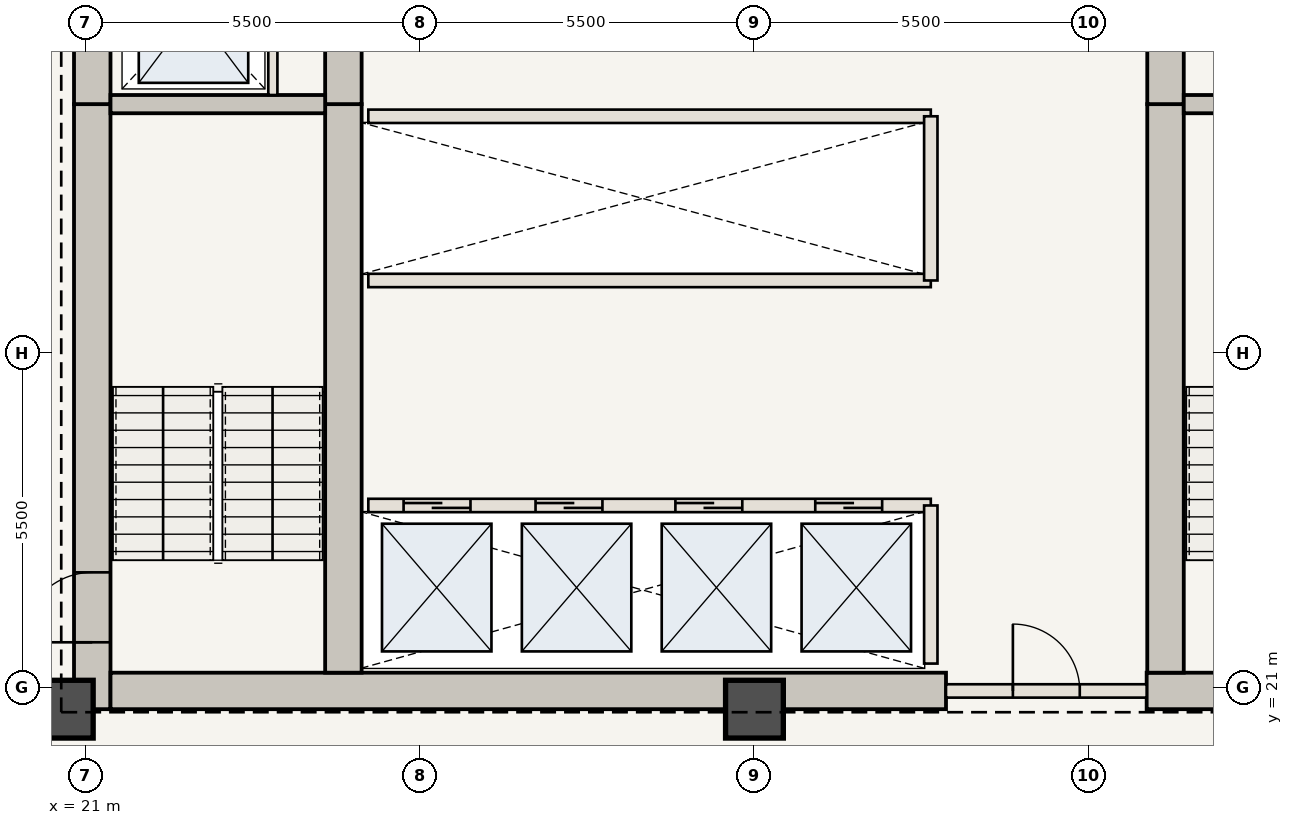
"""IFC4 building model, lengths in metres.
Left out: names, types, materials, properties, quantities, classifications, styles, units other than length and angle.
Written with IfcOpenShell. Run it as: python <this file> out.ifc"""

import sys

from ifc_helpers import new_model, si_unit, direction, frame, frame_2d, origin, origin_2d, place, context, subcontext, project, spatial, rectangle, extrude, element, fill, save


model = new_model("IFC4")
c1 = context("Model", 3, precision=1e-05, world=origin(), true_north=direction((0.0, 1.0)))
c2 = subcontext(c1, "Body", "Model", "MODEL_VIEW")
j1 = project(units=[si_unit("LENGTHUNIT", "METRE"), si_unit("PLANEANGLEUNIT", "RADIAN")], contexts=[c1])
p1 = place(None, origin())
s1 = spatial("IfcSite", under=j1, at=p1, CompositionType="ELEMENT")
p2 = place(p1, origin())
s2 = spatial("IfcBuilding", under=s1, at=p2, CompositionType="ELEMENT")
p3 = place(p2, frame((0.0, 0.0, 114.45)))
s3 = spatial("IfcBuildingStorey", under=s2, at=p3, CompositionType="ELEMENT", Elevation=114.45)
p4 = place(p3, frame((21.11, 20.65, 0.0), z_axis=(0.0, 0.0, 1.0), x_axis=(0.0, 1.0, 0.0)))
e1 = element("IfcWall", 1, at=p4, inside=s3, PredefinedType="SHEAR", context=c2, shape_type="SweptSolid", body=[
    extrude(rectangle(XDim=9.95, YDim=0.6, at=frame_2d((4.975, 0.0))), origin(), (0.0, 0.0, 1.0), 3.85),
])
p5 = place(p4, frame((1.1, 0.0, 0.0)))
e2 = element("IfcOpeningElement", 2, at=p5, cuts=e1, PredefinedType="OPENING", context=c2, shape_type="SweptSolid", body=[
    extrude(rectangle(XDim=1.15, YDim=2.15, at=frame_2d((0.575, 1.075))), frame((0.0, 0.31, 0.0), z_axis=(0.0, -1.0, 0.0), x_axis=(1.0, 0.0, 0.0)), (0.0, 0.0, 1.0), 0.62),
])
p6 = place(p3, frame((21.11, 30.6, 0.0), z_axis=(0.0, 0.0, 1.0), x_axis=(0.0, 1.0, 0.0)))
e3 = element("IfcWall", 3, at=p6, inside=s3, PredefinedType="SHEAR", context=c2, shape_type="SweptSolid", body=[
    extrude(rectangle(XDim=12.7, YDim=0.6, at=frame_2d((6.35, 0.0))), origin(), (0.0, 0.0, 1.0), 3.85),
])
p7 = place(p6, frame((4.2, 0.0, 0.0)))
e4 = element("IfcOpeningElement", 4, at=p7, cuts=e3, PredefinedType="OPENING", context=c2, shape_type="SweptSolid", body=[
    extrude(rectangle(XDim=1.1, YDim=2.15, at=frame_2d((0.55, 1.075))), frame((0.0, 0.31, 0.0), z_axis=(0.0, -1.0, 0.0), x_axis=(1.0, 0.0, 0.0)), (0.0, 0.0, 1.0), 0.62),
])
p8 = place(p6, frame((9.2, 0.0, 0.0)))
e5 = element("IfcOpeningElement", 5, at=p8, cuts=e3, PredefinedType="OPENING", context=c2, shape_type="SweptSolid", body=[
    extrude(rectangle(XDim=0.92, YDim=2.1, at=frame_2d((0.46, 1.05))), frame((0.0, 0.31, 0.0), z_axis=(0.0, -1.0, 0.0), x_axis=(1.0, 0.0, 0.0)), (0.0, 0.0, 1.0), 0.62),
])
p9 = place(p3, frame((21.41, 20.95, 0.0), z_axis=(0.0, 0.0, 1.0), x_axis=(1.0, 0.0, 0.0)))
e6 = element("IfcWall", 6, at=p9, inside=s3, PredefinedType="SHEAR", context=c2, shape_type="SweptSolid", body=[
    extrude(rectangle(XDim=13.74, YDim=0.6, at=frame_2d((6.87, 0.0))), origin(), (0.0, 0.0, 1.0), 3.85),
])
p10 = place(p3, frame((38.45, 20.95, 0.0), z_axis=(0.0, 0.0, 1.0), x_axis=(1.0, 0.0, 0.0)))
e7 = element("IfcWall", 7, at=p10, inside=s3, PredefinedType="SHEAR", context=c2, shape_type="SweptSolid", body=[
    extrude(rectangle(XDim=4.14, YDim=0.6, at=frame_2d((2.07, 0.0))), origin(), (0.0, 0.0, 1.0), 3.85),
])
p11 = place(p3, frame((25.24, 21.25, 0.0), z_axis=(0.0, 0.0, 1.0), x_axis=(0.0, 1.0, 0.0)))
e8 = element("IfcWall", 8, at=p11, inside=s3, PredefinedType="SHEAR", context=c2, shape_type="SweptSolid", body=[
    extrude(rectangle(XDim=9.35, YDim=0.6, at=frame_2d((4.675, 0.0))), origin(), (0.0, 0.0, 1.0), 3.85),
])
p12 = place(p3, frame((25.24, 30.6, 0.0), z_axis=(0.0, 0.0, 1.0), x_axis=(0.0, 1.0, 0.0)))
e9 = element("IfcWall", 9, at=p12, inside=s3, PredefinedType="SHEAR", context=c2, shape_type="SweptSolid", body=[
    extrude(rectangle(XDim=12.1, YDim=0.6, at=frame_2d((6.05, 0.0))), origin(), (0.0, 0.0, 1.0), 3.85),
])
p13 = place(p12, frame((6.25, 0.0, 0.0)))
e10 = element("IfcOpeningElement", 10, at=p13, cuts=e9, PredefinedType="OPENING", context=c2, shape_type="SweptSolid", body=[
    extrude(rectangle(XDim=1.1, YDim=2.15, at=frame_2d((0.55, 1.075))), frame((0.0, 0.31, 0.0), z_axis=(0.0, -1.0, 0.0), x_axis=(1.0, 0.0, 0.0)), (0.0, 0.0, 1.0), 0.62),
])
p14 = place(p3, frame((38.76, 21.25, 0.0), z_axis=(0.0, 0.0, 1.0), x_axis=(0.0, 1.0, 0.0)))
e11 = element("IfcWall", 11, at=p14, inside=s3, PredefinedType="SHEAR", context=c2, shape_type="SweptSolid", body=[
    extrude(rectangle(XDim=9.35, YDim=0.6, at=frame_2d((4.675, 0.0))), origin(), (0.0, 0.0, 1.0), 3.85),
])
p15 = place(p3, frame((38.76, 30.6, 0.0), z_axis=(0.0, 0.0, 1.0), x_axis=(0.0, 1.0, 0.0)))
e12 = element("IfcWall", 12, at=p15, inside=s3, PredefinedType="SHEAR", context=c2, shape_type="SweptSolid", body=[
    extrude(rectangle(XDim=12.1, YDim=0.6, at=frame_2d((6.05, 0.0))), origin(), (0.0, 0.0, 1.0), 3.85),
])
for number, where, z_axis, x_axis in (
    (13, (20.65, 20.65, 0.0), (0.0, 0.0, 1.0), (1.0, 0.0, 0.0)),
    (14, (32.0, 20.65, 0.0), (0.0, 0.0, 1.0), (1.0, 0.0, 0.0)),
):
    element("IfcColumn", number, at=place(p3, frame(where, z_axis=z_axis, x_axis=x_axis)), inside=s3, PredefinedType="COLUMN", context=c2, shape_type="SweptSolid", body=[
        extrude(rectangle(XDim=0.95, YDim=0.95, at=origin_2d()), origin(), (0.0, 0.0, 1.0), 3.85),
    ])
for number, where, z_axis, x_axis in (
    (15, (21.41, 30.6, 0.0), (0.0, 0.0, 1.0), (1.0, 0.0, 0.0)),
    (16, (39.06, 30.6, 0.0), (0.0, 0.0, 1.0), (1.0, 0.0, 0.0)),
):
    element("IfcWall", number, at=place(p3, frame(where, z_axis=z_axis, x_axis=x_axis)), inside=s3, PredefinedType="SHEAR", context=c2, shape_type="SweptSolid", body=[
        extrude(rectangle(XDim=3.53, YDim=0.3, at=frame_2d((1.765, 0.0))), origin(), (0.0, 0.0, 1.0), 3.685),
    ])
p16 = place(p3, frame((24.08, 30.75, 0.0), z_axis=(0.0, 0.0, 1.0), x_axis=(0.0, 1.0, 0.0)))
e17 = element("IfcWall", 17, at=p16, inside=s3, PredefinedType="STANDARD", context=c2, shape_type="SweptSolid", body=[
    extrude(rectangle(XDim=2.65, YDim=0.15, at=frame_2d((1.325, 0.0))), origin(), (0.0, 0.0, 1.0), 3.685),
])
p17 = place(p3, frame((35.15, 20.95, 0.0), z_axis=(0.0, 0.0, 1.0), x_axis=(1.0, 0.0, 0.0)))
e18 = element("IfcWall", 18, at=p17, inside=s3, PredefinedType="STANDARD", context=c2, shape_type="SweptSolid", body=[
    extrude(rectangle(XDim=3.3, YDim=0.22, at=frame_2d((1.65, 0.0))), origin(), (0.0, 0.0, 1.0), 3.685),
])
p18 = place(p17, frame((1.1, 0.0, 0.0)))
e19 = element("IfcOpeningElement", 19, at=p18, cuts=e18, PredefinedType="OPENING", context=c2, shape_type="SweptSolid", body=[
    extrude(rectangle(XDim=1.1, YDim=2.15, at=frame_2d((0.55, 1.075))), frame((0.0, 0.12, 0.0), z_axis=(0.0, -1.0, 0.0), x_axis=(1.0, 0.0, 0.0)), (0.0, 0.0, 1.0), 0.24),
])
p19 = place(p3, frame((25.65, 24.0, 0.0), z_axis=(0.0, 0.0, 1.0), x_axis=(1.0, 0.0, 0.0)))
e20 = element("IfcWall", 20, at=p19, inside=s3, PredefinedType="STANDARD", context=c2, shape_type="SweptSolid", body=[
    extrude(rectangle(XDim=9.25, YDim=0.22, at=frame_2d((4.625, 0.0))), origin(), (0.0, 0.0, 1.0), 3.685),
])
p20 = place(p19, frame((0.58, 0.0, 0.0)))
e21 = element("IfcOpeningElement", 21, at=p20, cuts=e20, PredefinedType="OPENING", context=c2, shape_type="SweptSolid", body=[
    extrude(rectangle(XDim=1.1, YDim=2.15, at=frame_2d((0.55, 1.075))), frame((0.0, 0.12, 0.0), z_axis=(0.0, -1.0, 0.0), x_axis=(1.0, 0.0, 0.0)), (0.0, 0.0, 1.0), 0.24),
])
p21 = place(p19, frame((2.75, 0.0, 0.0)))
e22 = element("IfcOpeningElement", 22, at=p21, cuts=e20, PredefinedType="OPENING", context=c2, shape_type="SweptSolid", body=[
    extrude(rectangle(XDim=1.1, YDim=2.15, at=frame_2d((0.55, 1.075))), frame((0.0, 0.12, 0.0), z_axis=(0.0, -1.0, 0.0), x_axis=(1.0, 0.0, 0.0)), (0.0, 0.0, 1.0), 0.24),
])
p22 = place(p19, frame((5.05, 0.0, 0.0)))
e23 = element("IfcOpeningElement", 23, at=p22, cuts=e20, PredefinedType="OPENING", context=c2, shape_type="SweptSolid", body=[
    extrude(rectangle(XDim=1.1, YDim=2.15, at=frame_2d((0.55, 1.075))), frame((0.0, 0.12, 0.0), z_axis=(0.0, -1.0, 0.0), x_axis=(1.0, 0.0, 0.0)), (0.0, 0.0, 1.0), 0.24),
])
p23 = place(p19, frame((7.35, 0.0, 0.0)))
e24 = element("IfcOpeningElement", 24, at=p23, cuts=e20, PredefinedType="OPENING", context=c2, shape_type="SweptSolid", body=[
    extrude(rectangle(XDim=1.1, YDim=2.15, at=frame_2d((0.55, 1.075))), frame((0.0, 0.12, 0.0), z_axis=(0.0, -1.0, 0.0), x_axis=(1.0, 0.0, 0.0)), (0.0, 0.0, 1.0), 0.24),
])
p24 = place(p3, frame((34.9, 21.4, 0.0), z_axis=(0.0, 0.0, 1.0), x_axis=(0.0, 1.0, 0.0)))
e25 = element("IfcWall", 25, at=p24, inside=s3, PredefinedType="STANDARD", context=c2, shape_type="SweptSolid", body=[
    extrude(rectangle(XDim=2.6, YDim=0.22, at=frame_2d((1.3, 0.0))), origin(), (0.0, 0.0, 1.0), 3.685),
])
for number, where, z_axis, x_axis in (
    (26, (25.65, 27.7, 0.0), (0.0, 0.0, 1.0), (1.0, 0.0, 0.0)),
    (27, (25.65, 30.4, 0.0), (0.0, 0.0, 1.0), (1.0, 0.0, 0.0)),
):
    element("IfcWall", number, at=place(p3, frame(where, z_axis=z_axis, x_axis=x_axis)), inside=s3, PredefinedType="STANDARD", context=c2, shape_type="SweptSolid", body=[
        extrude(rectangle(XDim=9.25, YDim=0.22, at=frame_2d((4.625, 0.0))), origin(), (0.0, 0.0, 1.0), 3.685),
    ])
p25 = place(p3, frame((34.9, 27.7, 0.0), z_axis=(0.0, 0.0, 1.0), x_axis=(0.0, 1.0, 0.0)))
e28 = element("IfcWall", 28, at=p25, inside=s3, PredefinedType="STANDARD", context=c2, shape_type="SweptSolid", body=[
    extrude(rectangle(XDim=2.7, YDim=0.22, at=frame_2d((1.35, 0.0))), origin(), (0.0, 0.0, 1.0), 3.685),
])
p26 = place(p5, origin())
e29 = element("IfcDoor", 29, at=p26, inside=s3, OperationType="SINGLE_SWING_LEFT", PredefinedType="DOOR", context=c2, shape_type="SweptSolid", body=[
    extrude(rectangle(XDim=1.15, YDim=2.15, at=frame_2d((0.575, 1.075))), frame((0.0, 0.025, 0.0), z_axis=(0.0, -1.0, 0.0), x_axis=(1.0, 0.0, 0.0)), (0.0, 0.0, 1.0), 0.05),
])
fill(e2, e29)
p27 = place(p18, origin())
e30 = element("IfcDoor", 30, at=p27, inside=s3, OperationType="SINGLE_SWING_LEFT", PredefinedType="DOOR", context=c2, shape_type="SweptSolid", body=[
    extrude(rectangle(XDim=1.1, YDim=2.15, at=frame_2d((0.55, 1.075))), frame((0.0, 0.025, 0.0), z_axis=(0.0, -1.0, 0.0), x_axis=(1.0, 0.0, 0.0)), (0.0, 0.0, 1.0), 0.05),
])
fill(e19, e30)
p28 = place(p20, origin())
e31 = element("IfcDoor", 31, at=p28, inside=s3, OperationType="DOUBLE_DOOR_SLIDING", PredefinedType="DOOR", context=c2, shape_type="SweptSolid", body=[
    extrude(rectangle(XDim=1.1, YDim=2.15, at=frame_2d((0.55, 1.075))), frame((0.0, 0.025, 0.0), z_axis=(0.0, -1.0, 0.0), x_axis=(1.0, 0.0, 0.0)), (0.0, 0.0, 1.0), 0.05),
])
fill(e21, e31)
p29 = place(p21, origin())
e32 = element("IfcDoor", 32, at=p29, inside=s3, OperationType="DOUBLE_DOOR_SLIDING", PredefinedType="DOOR", context=c2, shape_type="SweptSolid", body=[
    extrude(rectangle(XDim=1.1, YDim=2.15, at=frame_2d((0.55, 1.075))), frame((0.0, 0.025, 0.0), z_axis=(0.0, -1.0, 0.0), x_axis=(1.0, 0.0, 0.0)), (0.0, 0.0, 1.0), 0.05),
])
fill(e22, e32)
p30 = place(p22, origin())
e33 = element("IfcDoor", 33, at=p30, inside=s3, OperationType="DOUBLE_DOOR_SLIDING", PredefinedType="DOOR", context=c2, shape_type="SweptSolid", body=[
    extrude(rectangle(XDim=1.1, YDim=2.15, at=frame_2d((0.55, 1.075))), frame((0.0, 0.025, 0.0), z_axis=(0.0, -1.0, 0.0), x_axis=(1.0, 0.0, 0.0)), (0.0, 0.0, 1.0), 0.05),
])
fill(e23, e33)
p31 = place(p23, origin())
e34 = element("IfcDoor", 34, at=p31, inside=s3, OperationType="DOUBLE_DOOR_SLIDING", PredefinedType="DOOR", context=c2, shape_type="SweptSolid", body=[
    extrude(rectangle(XDim=1.1, YDim=2.15, at=frame_2d((0.55, 1.075))), frame((0.0, 0.025, 0.0), z_axis=(0.0, -1.0, 0.0), x_axis=(1.0, 0.0, 0.0)), (0.0, 0.0, 1.0), 0.05),
])
fill(e24, e34)
save(model, sys.argv[1])
